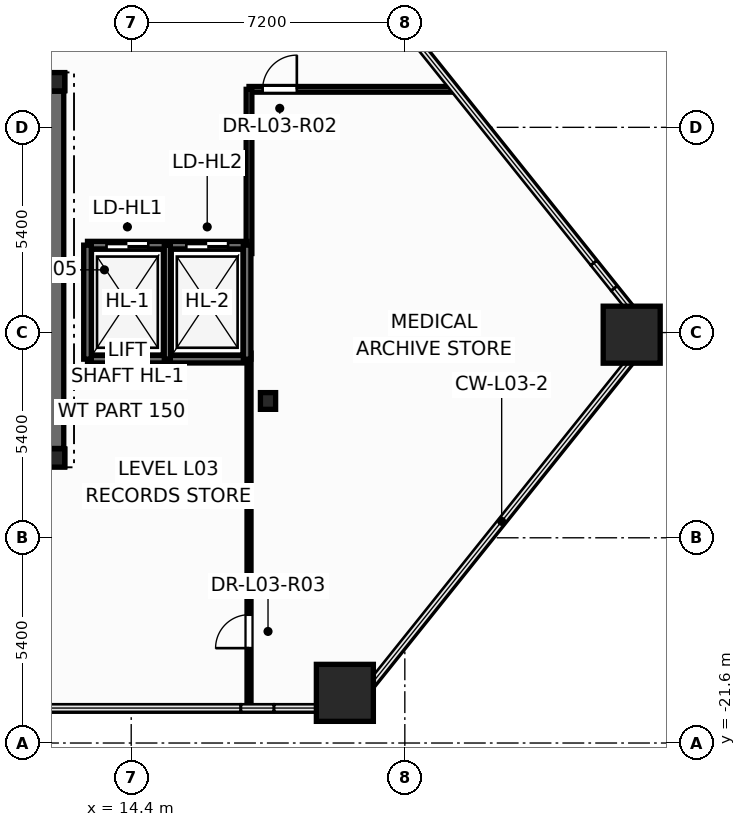
"""IFC4 building model, lengths in metres.
Left out: names, types, materials, properties, quantities, classifications, styles, units other than length and angle.
Written with IfcOpenShell. Run it as: python <this file> out.ifc"""

import sys

from ifc_helpers import new_model, si_unit, direction, frame, frame_2d, origin, origin_2d, place, context, subcontext, project, spatial, rectangle, hollow_rectangle, i_section, extrude, element, fill, save


model = new_model("IFC4")
c1 = context("Model", 3, precision=1e-05, world=origin(), true_north=direction((0.0, 1.0)))
c2 = subcontext(c1, "Body", "Model", "MODEL_VIEW")
j1 = project(units=[si_unit("LENGTHUNIT", "METRE"), si_unit("PLANEANGLEUNIT", "RADIAN")], contexts=[c1])
p1 = place(None, origin())
s1 = spatial("IfcSite", under=j1, at=p1, CompositionType="ELEMENT")
p2 = place(p1, origin())
s2 = spatial("IfcBuilding", under=s1, at=p2, CompositionType="ELEMENT")
p3 = place(p2, frame((0.0, 0.0, 14.4)))
s3 = spatial("IfcBuildingStorey", under=s2, at=p3, CompositionType="ELEMENT", Elevation=14.4)
for number, where, z_axis, x_axis in (
    (1, (20.022, -20.28, 0.0), (0.0, 0.0, 1.0), (1.0, 0.0, 0.0)),
    (2, (27.57, -10.856, 0.0), (0.0, 0.0, 1.0), (1.0, 0.0, 0.0)),
):
    element("IfcColumn", number, at=place(p3, frame(where, z_axis=z_axis, x_axis=x_axis)), inside=s3, PredefinedType="COLUMN", context=c2, shape_type="SweptSolid", body=[
        extrude(hollow_rectangle(XDim=1.5, YDim=1.5, WallThickness=0.075, at=origin_2d()), origin(), (0.0, 0.0, 1.0), 4.5),
    ])
for number, where, z_axis, x_axis in (
    (3, (12.4, -14.1, 0.0), (0.0, 0.0, 1.0), (1.0, 0.0, 0.0)),
    (4, (12.4, -4.2, 0.0), (0.0, 0.0, 1.0), (1.0, 0.0, 0.0)),
):
    element("IfcColumn", number, at=place(p3, frame(where, z_axis=z_axis, x_axis=x_axis)), inside=s3, PredefinedType="COLUMN", context=c2, shape_type="SweptSolid", body=[
        extrude(i_section(OverallWidth=0.5, OverallDepth=0.482, WebThickness=0.04, FlangeThickness=0.045, at=origin_2d()), origin(), (0.0, 0.0, 1.0), 4.5),
    ])
p4 = place(p3, frame((18.0, -12.6, 0.0), z_axis=(0.0, 0.0, 1.0), x_axis=(1.0, 0.0, 0.0)))
e5 = element("IfcColumn", 5, at=p4, inside=s3, PredefinedType="COLUMN", context=c2, shape_type="SweptSolid", body=[
    extrude(i_section(OverallWidth=0.4, OverallDepth=0.44, WebThickness=0.028, FlangeThickness=0.04, at=origin_2d()), origin(), (0.0, 0.0, 1.0), 4.5),
])
p5 = place(p3, frame((-12.65, -14.1, 0.0), z_axis=(0.0, 0.0, 1.0), x_axis=(1.0, 0.0, 0.0)))
e6 = element("IfcWall", 6, at=p5, inside=s3, PredefinedType="SHEAR", context=c2, shape_type="SweptSolid", body=[
    extrude(rectangle(XDim=25.3, YDim=0.45, at=frame_2d((12.65, 0.0))), origin(), (0.0, 0.0, 1.0), 4.5),
])
p6 = place(p3, frame((-12.65, -4.2, 0.0), z_axis=(0.0, 0.0, 1.0), x_axis=(1.0, 0.0, 0.0)))
e7 = element("IfcWall", 7, at=p6, inside=s3, PredefinedType="SHEAR", context=c2, shape_type="SweptSolid", body=[
    extrude(rectangle(XDim=25.3, YDim=0.45, at=frame_2d((12.65, 0.0))), origin(), (0.0, 0.0, 1.0), 4.5),
])
p7 = place(p6, frame((1.85, 0.0, 0.0)))
e8 = element("IfcOpeningElement", 8, at=p7, cuts=e7, PredefinedType="OPENING", context=c2, shape_type="SweptSolid", body=[
    extrude(rectangle(XDim=0.756, YDim=2.054, at=frame_2d((0.375, 1.027))), frame((0.0, 0.235, 0.0), z_axis=(0.0, -1.0, 0.0), x_axis=(1.0, 0.0, 0.0)), (0.0, 0.0, 1.0), 0.47),
])
p8 = place(p6, frame((22.65, 0.0, 0.0)))
e9 = element("IfcOpeningElement", 9, at=p8, cuts=e7, PredefinedType="OPENING", context=c2, shape_type="SweptSolid", body=[
    extrude(rectangle(XDim=0.756, YDim=2.054, at=frame_2d((0.375, 1.027))), frame((0.0, 0.235, 0.0), z_axis=(0.0, -1.0, 0.0), x_axis=(1.0, 0.0, 0.0)), (0.0, 0.0, 1.0), 0.47),
])
p9 = place(p6, frame((5.85, 0.0, 0.0)))
e10 = element("IfcOpeningElement", 10, at=p9, cuts=e7, PredefinedType="OPENING", context=c2, shape_type="SweptSolid", body=[
    extrude(rectangle(XDim=1.006, YDim=2.104, at=frame_2d((0.5, 1.052))), frame((0.0, 0.235, 0.0), z_axis=(0.0, -1.0, 0.0), x_axis=(1.0, 0.0, 0.0)), (0.0, 0.0, 1.0), 0.47),
])
p10 = place(p6, frame((10.35, 0.0, 0.0)))
e11 = element("IfcOpeningElement", 11, at=p10, cuts=e7, PredefinedType="OPENING", context=c2, shape_type="SweptSolid", body=[
    extrude(rectangle(XDim=1.406, YDim=2.154, at=frame_2d((0.7, 1.077))), frame((0.0, 0.235, 0.0), z_axis=(0.0, -1.0, 0.0), x_axis=(1.0, 0.0, 0.0)), (0.0, 0.0, 1.0), 0.47),
])
p11 = place(p6, frame((18.45, 0.0, 0.0)))
e12 = element("IfcOpeningElement", 12, at=p11, cuts=e7, PredefinedType="OPENING", context=c2, shape_type="SweptSolid", body=[
    extrude(rectangle(XDim=1.006, YDim=2.104, at=frame_2d((0.5, 1.052))), frame((0.0, 0.235, 0.0), z_axis=(0.0, -1.0, 0.0), x_axis=(1.0, 0.0, 0.0)), (0.0, 0.0, 1.0), 0.47),
])
for number, where, z_axis, x_axis in (
    (13, (8.48, -5.52, 0.0), (0.0, 0.0, 1.0), (1.0, 0.0, 0.0)),
    (14, (8.48, -13.1, 0.0), (0.0, 0.0, 1.0), (1.0, 0.0, 0.0)),
):
    element("IfcWall", number, at=place(p3, frame(where, z_axis=z_axis, x_axis=x_axis)), inside=s3, PredefinedType="SOLIDWALL", context=c2, shape_type="SweptSolid", body=[
        extrude(rectangle(XDim=3.87, YDim=0.2, at=frame_2d((1.935, 0.0))), origin(), (0.0, 0.0, 1.0), 4.5),
    ])
p12 = place(p3, frame((12.4, -13.85, 0.0), z_axis=(0.0, 0.0, 1.0), x_axis=(0.0, 1.0, 0.0)))
e15 = element("IfcWall", 15, at=p12, inside=s3, PredefinedType="SHEAR", context=c2, shape_type="SweptSolid", body=[
    extrude(rectangle(XDim=9.4, YDim=0.45, at=frame_2d((4.7, 0.0))), origin(), (0.0, 0.0, 1.0), 4.5),
])
p13 = place(p3, frame((17.5, -20.68, 0.0), z_axis=(0.0, 0.0, 1.0), x_axis=(0.0, 1.0, 0.0)))
e16 = element("IfcWall", 16, at=p13, inside=s3, PredefinedType="PARTITIONING", context=c2, shape_type="SweptSolid", body=[
    extrude(rectangle(XDim=9.34, YDim=0.105, at=frame_2d((4.67, 0.0))), origin(), (0.0, 0.0, 1.0), 3.463),
])
p14 = place(p13, frame((1.576, 0.0, 0.0)))
e17 = element("IfcOpeningElement", 17, at=p14, cuts=e16, PredefinedType="OPENING", context=c2, shape_type="SweptSolid", body=[
    extrude(rectangle(XDim=0.886, YDim=2.104, at=frame_2d((0.44, 1.052))), frame((0.0, 0.062, 0.0), z_axis=(0.0, -1.0, 0.0), x_axis=(1.0, 0.0, 0.0)), (0.0, 0.0, 1.0), 0.125),
])
p15 = place(p3, frame((17.5, -4.4, 0.0), z_axis=(0.0, 0.0, 1.0), x_axis=(1.0, 0.0, 0.0)))
e18 = element("IfcWall", 18, at=p15, inside=s3, PredefinedType="PARTITIONING", context=c2, shape_type="SweptSolid", body=[
    extrude(rectangle(XDim=5.412, YDim=0.15, at=frame_2d((2.706, 0.0))), origin(), (0.0, 0.0, 1.0), 3.463),
])
p16 = place(p15, frame((0.358, 0.0, 0.0)))
e19 = element("IfcOpeningElement", 19, at=p16, cuts=e18, PredefinedType="OPENING", context=c2, shape_type="SweptSolid", body=[
    extrude(rectangle(XDim=0.906, YDim=2.104, at=frame_2d((0.45, 1.052))), frame((0.0, 0.085, 0.0), z_axis=(0.0, -1.0, 0.0), x_axis=(1.0, 0.0, 0.0)), (0.0, 0.0, 1.0), 0.17),
])
p17 = place(p3, frame((17.5, -8.72, 0.0), z_axis=(0.0, 0.0, 1.0), x_axis=(0.0, 1.0, 0.0)))
e20 = element("IfcWall", 20, at=p17, inside=s3, PredefinedType="PARTITIONING", context=c2, shape_type="SweptSolid", body=[
    extrude(rectangle(XDim=4.32, YDim=0.15, at=frame_2d((2.16, 0.0))), origin(), (0.0, 0.0, 1.0), 4.1),
])
p18 = place(p3, frame((13.25, -11.5, 0.0), z_axis=(0.0, 0.0, 1.0), x_axis=(1.0, 0.0, 0.0)))
e21 = element("IfcWall", 21, at=p18, inside=s3, PredefinedType="SOLIDWALL", context=c2, shape_type="SweptSolid", body=[
    extrude(rectangle(XDim=4.2, YDim=0.2, at=frame_2d((2.1, 0.0))), origin(), (0.0, 0.0, 1.0), 4.5),
])
p19 = place(p3, frame((13.25, -8.5, 0.0), z_axis=(0.0, 0.0, 1.0), x_axis=(1.0, 0.0, 0.0)))
e22 = element("IfcWall", 22, at=p19, inside=s3, PredefinedType="SOLIDWALL", context=c2, shape_type="SweptSolid", body=[
    extrude(rectangle(XDim=4.2, YDim=0.2, at=frame_2d((2.1, 0.0))), origin(), (0.0, 0.0, 1.0), 4.5),
])
p20 = place(p19, frame((0.5, 0.0, 0.0)))
e23 = element("IfcOpeningElement", 23, at=p20, cuts=e22, PredefinedType="OPENING", context=c2, shape_type="SweptSolid", body=[
    extrude(rectangle(XDim=1.106, YDim=2.104, at=frame_2d((0.55, 1.052))), frame((0.0, 0.11, 0.0), z_axis=(0.0, -1.0, 0.0), x_axis=(1.0, 0.0, 0.0)), (0.0, 0.0, 1.0), 0.22),
])
p21 = place(p19, frame((2.6, 0.0, 0.0)))
e24 = element("IfcOpeningElement", 24, at=p21, cuts=e22, PredefinedType="OPENING", context=c2, shape_type="SweptSolid", body=[
    extrude(rectangle(XDim=1.106, YDim=2.104, at=frame_2d((0.55, 1.052))), frame((0.0, 0.11, 0.0), z_axis=(0.0, -1.0, 0.0), x_axis=(1.0, 0.0, 0.0)), (0.0, 0.0, 1.0), 0.22),
])
for number, where, z_axis, x_axis in (
    (25, (13.25, -11.5, 0.0), (0.0, 0.0, 1.0), (0.0, 1.0, 0.0)),
    (26, (17.45, -11.5, 0.0), (0.0, 0.0, 1.0), (0.0, 1.0, 0.0)),
):
    element("IfcWall", number, at=place(p3, frame(where, z_axis=z_axis, x_axis=x_axis)), inside=s3, PredefinedType="SOLIDWALL", context=c2, shape_type="SweptSolid", body=[
        extrude(rectangle(XDim=3.0, YDim=0.2, at=frame_2d((1.5, 0.0))), origin(), (0.0, 0.0, 1.0), 4.5),
    ])
p22 = place(p3, frame((15.35, -11.5, 0.0), z_axis=(0.0, 0.0, 1.0), x_axis=(0.0, 1.0, 0.0)))
e27 = element("IfcWall", 27, at=p22, inside=s3, PredefinedType="PARTITIONING", context=c2, shape_type="SweptSolid", body=[
    extrude(rectangle(XDim=3.0, YDim=0.16, at=frame_2d((1.5, 0.0))), origin(), (0.0, 0.0, 1.0), 4.1),
])
p23 = place(p20, origin())
e28 = element("IfcDoor", 28, at=p23, inside=s3, OperationType="DOUBLE_DOOR_SLIDING", PredefinedType="DOOR", context=c2, shape_type="SweptSolid", body=[
    extrude(rectangle(XDim=1.1, YDim=2.1, at=frame_2d((0.55, 1.05))), frame((0.0, 0.025, 0.0), z_axis=(0.0, -1.0, 0.0), x_axis=(1.0, 0.0, 0.0)), (0.0, 0.0, 1.0), 0.05),
])
fill(e23, e28)
p24 = place(p21, origin())
e29 = element("IfcDoor", 29, at=p24, inside=s3, OperationType="DOUBLE_DOOR_SLIDING", PredefinedType="DOOR", context=c2, shape_type="SweptSolid", body=[
    extrude(rectangle(XDim=1.1, YDim=2.1, at=frame_2d((0.55, 1.05))), frame((0.0, 0.025, 0.0), z_axis=(0.0, -1.0, 0.0), x_axis=(1.0, 0.0, 0.0)), (0.0, 0.0, 1.0), 0.05),
])
fill(e24, e29)
p25 = place(p16, origin())
e30 = element("IfcDoor", 30, at=p25, inside=s3, OperationType="SINGLE_SWING_RIGHT", PredefinedType="DOOR", context=c2, shape_type="SweptSolid", body=[
    extrude(rectangle(XDim=0.9, YDim=2.1, at=frame_2d((0.45, 1.05))), frame((0.0, 0.025, 0.0), z_axis=(0.0, -1.0, 0.0), x_axis=(1.0, 0.0, 0.0)), (0.0, 0.0, 1.0), 0.05),
])
fill(e19, e30)
p26 = place(p14, origin())
e31 = element("IfcDoor", 31, at=p26, inside=s3, OperationType="SINGLE_SWING_LEFT", PredefinedType="DOOR", context=c2, shape_type="SweptSolid", body=[
    extrude(rectangle(XDim=0.88, YDim=2.1, at=frame_2d((0.44, 1.05))), frame((0.0, 0.025, 0.0), z_axis=(0.0, -1.0, 0.0), x_axis=(1.0, 0.0, 0.0)), (0.0, 0.0, 1.0), 0.05),
])
fill(e17, e31)
save(model, sys.argv[1])
